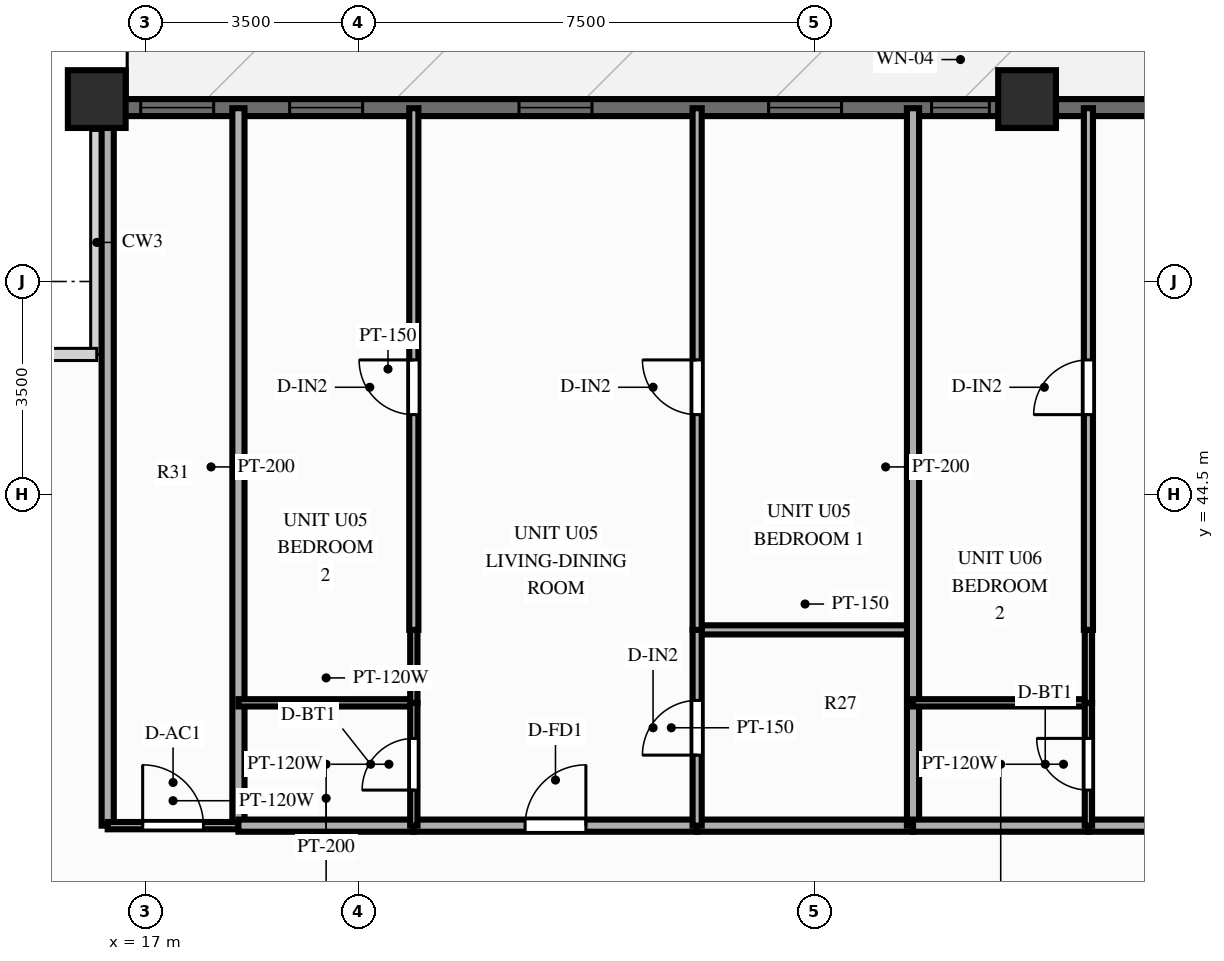
"""IFC4 building model, lengths in metres.
Left out: names, types, materials, properties, quantities, classifications, styles, units other than length and angle.
Written with IfcOpenShell. Run it as: python <this file> out.ifc"""

import sys

from ifc_helpers import new_model, si_unit, direction, frame, frame_2d, origin, origin_2d, place, context, subcontext, project, spatial, rectangle, extrude, source, transform, mapped, element, fill, save


model = new_model("IFC4")
c1 = context("Model", 3, precision=1e-05, world=origin(), true_north=direction((0.0, 1.0)))
c2 = subcontext(c1, "Body", "Model", "MODEL_VIEW")
j1 = project(units=[si_unit("LENGTHUNIT", "METRE"), si_unit("PLANEANGLEUNIT", "RADIAN")], contexts=[c1])
p1 = place(None, origin())
s1 = spatial("IfcSite", under=j1, at=p1, CompositionType="ELEMENT")
p2 = place(p1, origin())
s2 = spatial("IfcBuilding", under=s1, at=p2, CompositionType="ELEMENT")
p3 = place(p2, frame((0.0, 0.0, 89.85)))
s3 = spatial("IfcBuildingStorey", under=s2, at=p3, CompositionType="ELEMENT", Elevation=89.85)
m1 = source(origin(), c2, "Body", "SweptSolid", [
    extrude(rectangle(XDim=0.95, YDim=0.95, at=origin_2d()), origin(), (0.0, 0.0, 1.0), 3.0),
])
for number, where, z_axis, x_axis in (
    (1, (31.5, 51.0, 0.0), (0.0, 0.0, 1.0), (1.0, 0.0, 0.0)),
    (2, (16.2, 51.0, 0.0), (0.0, 0.0, 1.0), (1.0, 0.0, 0.0)),
):
    element("IfcColumn", number, at=place(p3, frame(where, z_axis=z_axis, x_axis=x_axis)), inside=s3, PredefinedType="COLUMN", context=c2, shape_type="MappedRepresentation", body=[
        mapped(m1, transform((0.0, 0.0, 0.0), scale=1.0)),
    ])
p4 = place(p3, frame((16.2, 50.86, 0.0), z_axis=(0.0, 0.0, 1.0), x_axis=(1.0, 0.0, 0.0)))
e3 = element("IfcWall", 3, at=p4, inside=s3, PredefinedType="SOLIDWALL", context=c2, shape_type="SweptSolid", body=[
    extrude(rectangle(XDim=43.6, YDim=0.28, at=frame_2d((21.8, 0.0))), origin(), (0.0, 0.0, 1.0), 2.28),
])
p5 = place(p4, frame((0.722, 0.0, 0.25)))
e4 = element("IfcOpeningElement", 4, at=p5, cuts=e3, PredefinedType="OPENING", context=c2, shape_type="SweptSolid", body=[
    extrude(rectangle(XDim=1.2, YDim=1.5, at=frame_2d((0.6, 0.75))), frame((0.0, 0.152, 0.0), z_axis=(0.0, -1.0, 0.0), x_axis=(1.0, 0.0, 0.0)), (0.0, 0.0, 1.0), 0.304),
])
p6 = place(p4, frame((3.172, 0.0, 0.25)))
e5 = element("IfcOpeningElement", 5, at=p6, cuts=e3, PredefinedType="OPENING", context=c2, shape_type="SweptSolid", body=[
    extrude(rectangle(XDim=1.2, YDim=1.5, at=frame_2d((0.6, 0.75))), frame((0.0, 0.152, 0.0), z_axis=(0.0, -1.0, 0.0), x_axis=(1.0, 0.0, 0.0)), (0.0, 0.0, 1.0), 0.304),
])
p7 = place(p4, frame((6.944, 0.0, 0.25)))
e6 = element("IfcOpeningElement", 6, at=p7, cuts=e3, PredefinedType="OPENING", context=c2, shape_type="SweptSolid", body=[
    extrude(rectangle(XDim=1.2, YDim=1.5, at=frame_2d((0.6, 0.75))), frame((0.0, 0.152, 0.0), z_axis=(0.0, -1.0, 0.0), x_axis=(1.0, 0.0, 0.0)), (0.0, 0.0, 1.0), 0.304),
])
p8 = place(p4, frame((11.049, 0.0, 0.25)))
e7 = element("IfcOpeningElement", 7, at=p8, cuts=e3, PredefinedType="OPENING", context=c2, shape_type="SweptSolid", body=[
    extrude(rectangle(XDim=1.2, YDim=1.5, at=frame_2d((0.6, 0.75))), frame((0.0, 0.152, 0.0), z_axis=(0.0, -1.0, 0.0), x_axis=(1.0, 0.0, 0.0)), (0.0, 0.0, 1.0), 0.304),
])
p9 = place(p4, frame((13.73, 0.0, 0.25)))
e8 = element("IfcOpeningElement", 8, at=p9, cuts=e3, PredefinedType="OPENING", context=c2, shape_type="SweptSolid", body=[
    extrude(rectangle(XDim=0.95, YDim=1.5, at=frame_2d((0.475, 0.75))), frame((0.0, 0.152, 0.0), z_axis=(0.0, -1.0, 0.0), x_axis=(1.0, 0.0, 0.0)), (0.0, 0.0, 1.0), 0.304),
])
p10 = place(p4, frame((18.089, 0.0, 0.0)))
e9 = element("IfcOpeningElement", 9, at=p10, cuts=e3, PredefinedType="OPENING", context=c2, shape_type="SweptSolid", body=[
    extrude(rectangle(XDim=1.1, YDim=2.15, at=frame_2d((0.55, 1.075))), frame((0.0, 0.152, 0.0), z_axis=(0.0, -1.0, 0.0), x_axis=(1.0, 0.0, 0.0)), (0.0, 0.0, 1.0), 0.304),
])
p11 = place(p4, frame((22.144, 0.0, 0.25)))
e10 = element("IfcOpeningElement", 10, at=p11, cuts=e3, PredefinedType="OPENING", context=c2, shape_type="SweptSolid", body=[
    extrude(rectangle(XDim=1.2, YDim=1.5, at=frame_2d((0.6, 0.75))), frame((0.0, 0.152, 0.0), z_axis=(0.0, -1.0, 0.0), x_axis=(1.0, 0.0, 0.0)), (0.0, 0.0, 1.0), 0.304),
])
p12 = place(p4, frame((25.242, 0.0, 0.25)))
e11 = element("IfcOpeningElement", 11, at=p12, cuts=e3, PredefinedType="OPENING", context=c2, shape_type="SweptSolid", body=[
    extrude(rectangle(XDim=1.2, YDim=1.5, at=frame_2d((0.6, 0.75))), frame((0.0, 0.152, 0.0), z_axis=(0.0, -1.0, 0.0), x_axis=(1.0, 0.0, 0.0)), (0.0, 0.0, 1.0), 0.304),
])
p13 = place(p4, frame((29.021, 0.0, 0.25)))
e12 = element("IfcOpeningElement", 12, at=p13, cuts=e3, PredefinedType="OPENING", context=c2, shape_type="SweptSolid", body=[
    extrude(rectangle(XDim=0.95, YDim=1.5, at=frame_2d((0.475, 0.75))), frame((0.0, 0.152, 0.0), z_axis=(0.0, -1.0, 0.0), x_axis=(1.0, 0.0, 0.0)), (0.0, 0.0, 1.0), 0.304),
])
p14 = place(p4, frame((31.574, 0.0, 0.25)))
e13 = element("IfcOpeningElement", 13, at=p14, cuts=e3, PredefinedType="OPENING", context=c2, shape_type="SweptSolid", body=[
    extrude(rectangle(XDim=1.2, YDim=1.5, at=frame_2d((0.6, 0.75))), frame((0.0, 0.152, 0.0), z_axis=(0.0, -1.0, 0.0), x_axis=(1.0, 0.0, 0.0)), (0.0, 0.0, 1.0), 0.304),
])
p15 = place(p4, frame((34.692, 0.0, 0.25)))
e14 = element("IfcOpeningElement", 14, at=p15, cuts=e3, PredefinedType="OPENING", context=c2, shape_type="SweptSolid", body=[
    extrude(rectangle(XDim=1.2, YDim=1.5, at=frame_2d((0.6, 0.75))), frame((0.0, 0.152, 0.0), z_axis=(0.0, -1.0, 0.0), x_axis=(1.0, 0.0, 0.0)), (0.0, 0.0, 1.0), 0.304),
])
p16 = place(p4, frame((37.622, 0.0, 0.25)))
e15 = element("IfcOpeningElement", 15, at=p16, cuts=e3, PredefinedType="OPENING", context=c2, shape_type="SweptSolid", body=[
    extrude(rectangle(XDim=1.2, YDim=1.5, at=frame_2d((0.6, 0.75))), frame((0.0, 0.152, 0.0), z_axis=(0.0, -1.0, 0.0), x_axis=(1.0, 0.0, 0.0)), (0.0, 0.0, 1.0), 0.304),
])
p17 = place(p4, frame((40.957, 0.0, 0.25)))
e16 = element("IfcOpeningElement", 16, at=p17, cuts=e3, PredefinedType="OPENING", context=c2, shape_type="SweptSolid", body=[
    extrude(rectangle(XDim=1.2, YDim=1.5, at=frame_2d((0.6, 0.75))), frame((0.0, 0.152, 0.0), z_axis=(0.0, -1.0, 0.0), x_axis=(1.0, 0.0, 0.0)), (0.0, 0.0, 1.0), 0.304),
])
for number, where, z_axis, x_axis in (
    (17, (16.38, 39.05, 0.0), (0.0, 0.0, 1.0), (0.0, 1.0, 0.0)),
    (18, (18.53, 39.05, 0.0), (0.0, 0.0, 1.0), (0.0, 1.0, 0.0)),
):
    element("IfcWall", number, at=place(p3, frame(where, z_axis=z_axis, x_axis=x_axis)), inside=s3, PredefinedType="PARTITIONING", context=c2, shape_type="SweptSolid", body=[
        extrude(rectangle(XDim=11.8, YDim=0.2, at=frame_2d((5.9, 0.0))), origin(), (0.0, 0.0, 1.0), 2.79),
    ])
p18 = place(p3, frame((16.38, 39.05, 0.0), z_axis=(0.0, 0.0, 1.0), x_axis=(1.0, 0.0, 0.0)))
e19 = element("IfcWall", 19, at=p18, inside=s3, PredefinedType="PARTITIONING", context=c2, shape_type="SweptSolid", body=[
    extrude(rectangle(XDim=2.15, YDim=0.12, at=frame_2d((1.075, 0.0))), origin(), (0.0, 0.0, 1.0), 2.79),
])
p19 = place(p18, frame((0.575, 0.0, 0.0)))
e20 = element("IfcOpeningElement", 20, at=p19, cuts=e19, PredefinedType="OPENING", context=c2, shape_type="SweptSolid", body=[
    extrude(rectangle(XDim=1.0, YDim=2.1, at=frame_2d((0.5, 1.05))), frame((0.0, 0.072, 0.0), z_axis=(0.0, -1.0, 0.0), x_axis=(1.0, 0.0, 0.0)), (0.0, 0.0, 1.0), 0.144),
])
p20 = place(p3, frame((18.53, 39.05, 0.0), z_axis=(0.0, 0.0, 1.0), x_axis=(1.0, 0.0, 0.0)))
e21 = element("IfcWall", 21, at=p20, inside=s3, PredefinedType="PARTITIONING", context=c2, shape_type="SweptSolid", body=[
    extrude(rectangle(XDim=2.885, YDim=0.2, at=frame_2d((1.442, 0.0))), origin(), (0.0, 0.0, 1.0), 2.79),
])
p21 = place(p3, frame((21.415, 39.05, 0.0), z_axis=(0.0, 0.0, 1.0), x_axis=(1.0, 0.0, 0.0)))
e22 = element("IfcWall", 22, at=p21, inside=s3, PredefinedType="PARTITIONING", context=c2, shape_type="SweptSolid", body=[
    extrude(rectangle(XDim=4.66, YDim=0.2, at=frame_2d((2.33, 0.0))), origin(), (0.0, 0.0, 1.0), 2.79),
])
p22 = place(p21, frame((1.83, 0.0, 0.0)))
e23 = element("IfcOpeningElement", 23, at=p22, cuts=e22, PredefinedType="OPENING", context=c2, shape_type="SweptSolid", body=[
    extrude(rectangle(XDim=1.0, YDim=2.15, at=frame_2d((0.5, 1.075))), frame((0.0, 0.112, 0.0), z_axis=(0.0, -1.0, 0.0), x_axis=(1.0, 0.0, 0.0)), (0.0, 0.0, 1.0), 0.224),
])
p23 = place(p3, frame((26.074, 39.05, 0.0), z_axis=(0.0, 0.0, 1.0), x_axis=(1.0, 0.0, 0.0)))
e24 = element("IfcWall", 24, at=p23, inside=s3, PredefinedType="PARTITIONING", context=c2, shape_type="SweptSolid", body=[
    extrude(rectangle(XDim=3.55, YDim=0.2, at=frame_2d((1.775, 0.0))), origin(), (0.0, 0.0, 1.0), 2.79),
])
p24 = place(p3, frame((18.53, 41.07, 0.0), z_axis=(0.0, 0.0, 1.0), x_axis=(1.0, 0.0, 0.0)))
e25 = element("IfcWall", 25, at=p24, inside=s3, PredefinedType="PARTITIONING", context=c2, shape_type="SweptSolid", body=[
    extrude(rectangle(XDim=2.885, YDim=0.12, at=frame_2d((1.442, 0.0))), origin(), (0.0, 0.0, 1.0), 2.79),
])
p25 = place(p3, frame((26.074, 42.27, 0.0), z_axis=(0.0, 0.0, 1.0), x_axis=(1.0, 0.0, 0.0)))
e26 = element("IfcWall", 26, at=p25, inside=s3, PredefinedType="PARTITIONING", context=c2, shape_type="SweptSolid", body=[
    extrude(rectangle(XDim=3.55, YDim=0.15, at=frame_2d((1.775, 0.0))), origin(), (0.0, 0.0, 1.0), 2.79),
])
p26 = place(p3, frame((21.415, 39.05, 0.0), z_axis=(0.0, 0.0, 1.0), x_axis=(0.0, 1.0, 0.0)))
e27 = element("IfcWall", 27, at=p26, inside=s3, PredefinedType="PARTITIONING", context=c2, shape_type="SweptSolid", body=[
    extrude(rectangle(XDim=2.02, YDim=0.12, at=frame_2d((1.01, 0.0))), origin(), (0.0, 0.0, 1.0), 2.79),
])
p27 = place(p26, frame((0.585, 0.0, 0.0)))
e28 = element("IfcOpeningElement", 28, at=p27, cuts=e27, PredefinedType="OPENING", context=c2, shape_type="SweptSolid", body=[
    extrude(rectangle(XDim=0.85, YDim=2.05, at=frame_2d((0.425, 1.025))), frame((0.0, 0.072, 0.0), z_axis=(0.0, -1.0, 0.0), x_axis=(1.0, 0.0, 0.0)), (0.0, 0.0, 1.0), 0.144),
])
p28 = place(p3, frame((21.415, 41.07, 0.0), z_axis=(0.0, 0.0, 1.0), x_axis=(0.0, 1.0, 0.0)))
e29 = element("IfcWall", 29, at=p28, inside=s3, PredefinedType="PARTITIONING", context=c2, shape_type="SweptSolid", body=[
    extrude(rectangle(XDim=1.2, YDim=0.12, at=frame_2d((0.6, 0.0))), origin(), (0.0, 0.0, 1.0), 2.79),
])
p29 = place(p3, frame((21.415, 42.27, 0.0), z_axis=(0.0, 0.0, 1.0), x_axis=(0.0, 1.0, 0.0)))
e30 = element("IfcWall", 30, at=p29, inside=s3, PredefinedType="PARTITIONING", context=c2, shape_type="SweptSolid", body=[
    extrude(rectangle(XDim=8.58, YDim=0.15, at=frame_2d((4.29, 0.0))), origin(), (0.0, 0.0, 1.0), 2.79),
])
p30 = place(p29, frame((3.54, 0.0, 0.0)))
e31 = element("IfcOpeningElement", 31, at=p30, cuts=e30, PredefinedType="OPENING", context=c2, shape_type="SweptSolid", body=[
    extrude(rectangle(XDim=0.9, YDim=2.1, at=frame_2d((0.45, 1.05))), frame((0.0, 0.087, 0.0), z_axis=(0.0, -1.0, 0.0), x_axis=(1.0, 0.0, 0.0)), (0.0, 0.0, 1.0), 0.174),
])
p31 = place(p3, frame((26.074, 39.05, 0.0), z_axis=(0.0, 0.0, 1.0), x_axis=(0.0, 1.0, 0.0)))
e32 = element("IfcWall", 32, at=p31, inside=s3, PredefinedType="PARTITIONING", context=c2, shape_type="SweptSolid", body=[
    extrude(rectangle(XDim=3.22, YDim=0.15, at=frame_2d((1.61, 0.0))), origin(), (0.0, 0.0, 1.0), 2.79),
])
p32 = place(p31, frame((1.16, 0.0, 0.0)))
e33 = element("IfcOpeningElement", 33, at=p32, cuts=e32, PredefinedType="OPENING", context=c2, shape_type="SweptSolid", body=[
    extrude(rectangle(XDim=0.9, YDim=2.1, at=frame_2d((0.45, 1.05))), frame((0.0, 0.087, 0.0), z_axis=(0.0, -1.0, 0.0), x_axis=(1.0, 0.0, 0.0)), (0.0, 0.0, 1.0), 0.174),
])
p33 = place(p3, frame((26.074, 42.27, 0.0), z_axis=(0.0, 0.0, 1.0), x_axis=(0.0, 1.0, 0.0)))
e34 = element("IfcWall", 34, at=p33, inside=s3, PredefinedType="PARTITIONING", context=c2, shape_type="SweptSolid", body=[
    extrude(rectangle(XDim=8.58, YDim=0.15, at=frame_2d((4.29, 0.0))), origin(), (0.0, 0.0, 1.0), 2.79),
])
p34 = place(p33, frame((3.54, 0.0, 0.0)))
e35 = element("IfcOpeningElement", 35, at=p34, cuts=e34, PredefinedType="OPENING", context=c2, shape_type="SweptSolid", body=[
    extrude(rectangle(XDim=0.9, YDim=2.1, at=frame_2d((0.45, 1.05))), frame((0.0, 0.087, 0.0), z_axis=(0.0, -1.0, 0.0), x_axis=(1.0, 0.0, 0.0)), (0.0, 0.0, 1.0), 0.174),
])
p35 = place(p3, frame((29.624, 39.05, 0.0), z_axis=(0.0, 0.0, 1.0), x_axis=(0.0, 1.0, 0.0)))
e36 = element("IfcWall", 36, at=p35, inside=s3, PredefinedType="PARTITIONING", context=c2, shape_type="SweptSolid", body=[
    extrude(rectangle(XDim=11.8, YDim=0.2, at=frame_2d((5.9, 0.0))), origin(), (0.0, 0.0, 1.0), 2.79),
])
p36 = place(p3, frame((29.624, 39.05, 0.0), z_axis=(0.0, 0.0, 1.0), x_axis=(1.0, 0.0, 0.0)))
e37 = element("IfcWall", 37, at=p36, inside=s3, PredefinedType="PARTITIONING", context=c2, shape_type="SweptSolid", body=[
    extrude(rectangle(XDim=2.885, YDim=0.2, at=frame_2d((1.442, 0.0))), origin(), (0.0, 0.0, 1.0), 2.79),
])
p37 = place(p3, frame((32.509, 39.05, 0.0), z_axis=(0.0, 0.0, 1.0), x_axis=(1.0, 0.0, 0.0)))
e38 = element("IfcWall", 38, at=p37, inside=s3, PredefinedType="PARTITIONING", context=c2, shape_type="SweptSolid", body=[
    extrude(rectangle(XDim=4.66, YDim=0.2, at=frame_2d((2.33, 0.0))), origin(), (0.0, 0.0, 1.0), 2.79),
])
p38 = place(p37, frame((1.83, 0.0, 0.0)))
e39 = element("IfcOpeningElement", 39, at=p38, cuts=e38, PredefinedType="OPENING", context=c2, shape_type="SweptSolid", body=[
    extrude(rectangle(XDim=1.0, YDim=2.15, at=frame_2d((0.5, 1.075))), frame((0.0, 0.112, 0.0), z_axis=(0.0, -1.0, 0.0), x_axis=(1.0, 0.0, 0.0)), (0.0, 0.0, 1.0), 0.224),
])
p39 = place(p3, frame((29.624, 41.07, 0.0), z_axis=(0.0, 0.0, 1.0), x_axis=(1.0, 0.0, 0.0)))
e40 = element("IfcWall", 40, at=p39, inside=s3, PredefinedType="PARTITIONING", context=c2, shape_type="SweptSolid", body=[
    extrude(rectangle(XDim=2.885, YDim=0.12, at=frame_2d((1.442, 0.0))), origin(), (0.0, 0.0, 1.0), 2.79),
])
p40 = place(p3, frame((32.509, 39.05, 0.0), z_axis=(0.0, 0.0, 1.0), x_axis=(0.0, 1.0, 0.0)))
e41 = element("IfcWall", 41, at=p40, inside=s3, PredefinedType="PARTITIONING", context=c2, shape_type="SweptSolid", body=[
    extrude(rectangle(XDim=2.02, YDim=0.12, at=frame_2d((1.01, 0.0))), origin(), (0.0, 0.0, 1.0), 2.79),
])
p41 = place(p40, frame((0.585, 0.0, 0.0)))
e42 = element("IfcOpeningElement", 42, at=p41, cuts=e41, PredefinedType="OPENING", context=c2, shape_type="SweptSolid", body=[
    extrude(rectangle(XDim=0.85, YDim=2.05, at=frame_2d((0.425, 1.025))), frame((0.0, 0.072, 0.0), z_axis=(0.0, -1.0, 0.0), x_axis=(1.0, 0.0, 0.0)), (0.0, 0.0, 1.0), 0.144),
])
p42 = place(p3, frame((32.509, 41.07, 0.0), z_axis=(0.0, 0.0, 1.0), x_axis=(0.0, 1.0, 0.0)))
e43 = element("IfcWall", 43, at=p42, inside=s3, PredefinedType="PARTITIONING", context=c2, shape_type="SweptSolid", body=[
    extrude(rectangle(XDim=1.2, YDim=0.12, at=frame_2d((0.6, 0.0))), origin(), (0.0, 0.0, 1.0), 2.79),
])
p43 = place(p3, frame((32.509, 42.27, 0.0), z_axis=(0.0, 0.0, 1.0), x_axis=(0.0, 1.0, 0.0)))
e44 = element("IfcWall", 44, at=p43, inside=s3, PredefinedType="PARTITIONING", context=c2, shape_type="SweptSolid", body=[
    extrude(rectangle(XDim=8.58, YDim=0.15, at=frame_2d((4.29, 0.0))), origin(), (0.0, 0.0, 1.0), 2.79),
])
p44 = place(p43, frame((3.54, 0.0, 0.0)))
e45 = element("IfcOpeningElement", 45, at=p44, cuts=e44, PredefinedType="OPENING", context=c2, shape_type="SweptSolid", body=[
    extrude(rectangle(XDim=0.9, YDim=2.1, at=frame_2d((0.45, 1.05))), frame((0.0, 0.087, 0.0), z_axis=(0.0, -1.0, 0.0), x_axis=(1.0, 0.0, 0.0)), (0.0, 0.0, 1.0), 0.174),
])
m2 = source(origin(), c2, "Body", "SweptSolid", [
    extrude(rectangle(XDim=1.2, YDim=1.5, at=frame_2d((0.6, 0.75))), frame((0.0, 0.03, 0.0), z_axis=(0.0, -1.0, 0.0), x_axis=(1.0, 0.0, 0.0)), (0.0, 0.0, 1.0), 0.06),
])
p45 = place(p5, origin())
e46 = element("IfcWindow", 46, at=p45, inside=s3, PartitioningType="SINGLE_PANEL", PredefinedType="WINDOW", context=c2, shape_type="MappedRepresentation", body=[
    mapped(m2, transform((0.0, 0.0, 0.0), scale=1.0)),
])
fill(e4, e46)
p46 = place(p6, origin())
e47 = element("IfcWindow", 47, at=p46, inside=s3, PartitioningType="SINGLE_PANEL", PredefinedType="WINDOW", context=c2, shape_type="MappedRepresentation", body=[
    mapped(m2, transform((0.0, 0.0, 0.0), scale=1.0)),
])
fill(e5, e47)
p47 = place(p7, origin())
e48 = element("IfcWindow", 48, at=p47, inside=s3, PartitioningType="SINGLE_PANEL", PredefinedType="WINDOW", context=c2, shape_type="MappedRepresentation", body=[
    mapped(m2, transform((0.0, 0.0, 0.0), scale=1.0)),
])
fill(e6, e48)
p48 = place(p8, origin())
e49 = element("IfcWindow", 49, at=p48, inside=s3, PartitioningType="SINGLE_PANEL", PredefinedType="WINDOW", context=c2, shape_type="MappedRepresentation", body=[
    mapped(m2, transform((0.0, 0.0, 0.0), scale=1.0)),
])
fill(e7, e49)
m3 = source(origin(), c2, "Body", "SweptSolid", [
    extrude(rectangle(XDim=0.95, YDim=1.5, at=frame_2d((0.475, 0.75))), frame((0.0, 0.03, 0.0), z_axis=(0.0, -1.0, 0.0), x_axis=(1.0, 0.0, 0.0)), (0.0, 0.0, 1.0), 0.06),
])
p49 = place(p9, origin())
e50 = element("IfcWindow", 50, at=p49, inside=s3, PartitioningType="SINGLE_PANEL", PredefinedType="WINDOW", context=c2, shape_type="MappedRepresentation", body=[
    mapped(m3, transform((0.0, 0.0, 0.0), scale=1.0)),
])
fill(e8, e50)
m4 = source(origin(), c2, "Body", "SweptSolid", [
    extrude(rectangle(XDim=1.0, YDim=2.1, at=frame_2d((0.5, 1.05))), frame((0.0, 0.025, 0.0), z_axis=(0.0, -1.0, 0.0), x_axis=(1.0, 0.0, 0.0)), (0.0, 0.0, 1.0), 0.05),
])
p50 = place(p19, origin())
e51 = element("IfcDoor", 51, at=p50, inside=s3, OperationType="SINGLE_SWING_LEFT", PredefinedType="DOOR", context=c2, shape_type="MappedRepresentation", body=[
    mapped(m4, transform((0.0, 0.0, 0.0), scale=1.0)),
])
fill(e20, e51)
m5 = source(origin(), c2, "Body", "SweptSolid", [
    extrude(rectangle(XDim=1.0, YDim=2.15, at=frame_2d((0.5, 1.075))), frame((0.0, 0.025, 0.0), z_axis=(0.0, -1.0, 0.0), x_axis=(1.0, 0.0, 0.0)), (0.0, 0.0, 1.0), 0.05),
])
p51 = place(p22, origin())
e52 = element("IfcDoor", 52, at=p51, inside=s3, OperationType="SINGLE_SWING_RIGHT", PredefinedType="DOOR", context=c2, shape_type="MappedRepresentation", body=[
    mapped(m5, transform((0.0, 0.0, 0.0), scale=1.0)),
])
fill(e23, e52)
m6 = source(origin(), c2, "Body", "SweptSolid", [
    extrude(rectangle(XDim=0.85, YDim=2.05, at=frame_2d((0.425, 1.025))), frame((0.0, 0.025, 0.0), z_axis=(0.0, -1.0, 0.0), x_axis=(1.0, 0.0, 0.0)), (0.0, 0.0, 1.0), 0.05),
])
p52 = place(p27, origin())
e53 = element("IfcDoor", 53, at=p52, inside=s3, OperationType="SINGLE_SWING_LEFT", PredefinedType="DOOR", context=c2, shape_type="MappedRepresentation", body=[
    mapped(m6, transform((0.0, 0.0, 0.0), scale=1.0)),
])
fill(e28, e53)
m7 = source(origin(), c2, "Body", "SweptSolid", [
    extrude(rectangle(XDim=0.9, YDim=2.1, at=frame_2d((0.45, 1.05))), frame((0.0, 0.025, 0.0), z_axis=(0.0, -1.0, 0.0), x_axis=(1.0, 0.0, 0.0)), (0.0, 0.0, 1.0), 0.05),
])
p53 = place(p30, origin())
e54 = element("IfcDoor", 54, at=p53, inside=s3, OperationType="SINGLE_SWING_RIGHT", PredefinedType="DOOR", context=c2, shape_type="MappedRepresentation", body=[
    mapped(m7, transform((0.0, 0.0, 0.0), scale=1.0)),
])
fill(e31, e54)
p54 = place(p32, origin())
e55 = element("IfcDoor", 55, at=p54, inside=s3, OperationType="SINGLE_SWING_LEFT", PredefinedType="DOOR", context=c2, shape_type="MappedRepresentation", body=[
    mapped(m7, transform((0.0, 0.0, 0.0), scale=1.0)),
])
fill(e33, e55)
p55 = place(p34, origin())
e56 = element("IfcDoor", 56, at=p55, inside=s3, OperationType="SINGLE_SWING_RIGHT", PredefinedType="DOOR", context=c2, shape_type="MappedRepresentation", body=[
    mapped(m7, transform((0.0, 0.0, 0.0), scale=1.0)),
])
fill(e35, e56)
p56 = place(p41, origin())
e57 = element("IfcDoor", 57, at=p56, inside=s3, OperationType="SINGLE_SWING_RIGHT", PredefinedType="DOOR", context=c2, shape_type="MappedRepresentation", body=[
    mapped(m6, transform((0.0, 0.0, 0.0), scale=1.0)),
])
fill(e42, e57)
p57 = place(p44, origin())
e58 = element("IfcDoor", 58, at=p57, inside=s3, OperationType="SINGLE_SWING_LEFT", PredefinedType="DOOR", context=c2, shape_type="MappedRepresentation", body=[
    mapped(m7, transform((0.0, 0.0, 0.0), scale=1.0)),
])
fill(e45, e58)
save(model, sys.argv[1])
